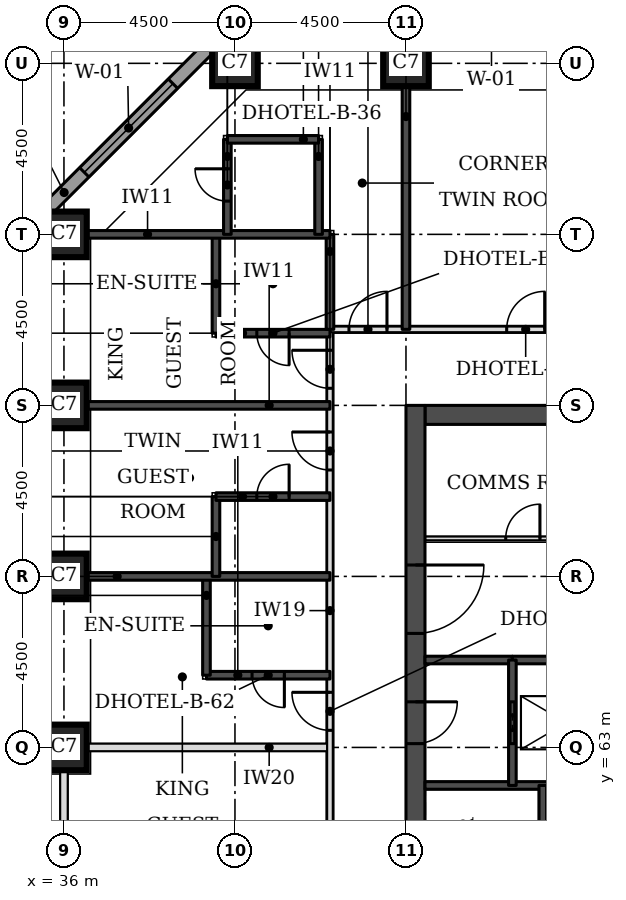
"""IFC4 building model, lengths in metres.
Left out: names, types, materials, properties, quantities, classifications, styles, units other than length and angle.
Written with IfcOpenShell. Run it as: python <this file> out.ifc"""

import sys

from ifc_helpers import new_model, si_unit, direction, frame, frame_2d, origin, origin_2d, place, context, subcontext, project, spatial, rectangle, extrude, element, fill, save


model = new_model("IFC4")
c1 = context("Model", 3, precision=1e-05, world=origin(), true_north=direction((0.0, 1.0)))
c2 = subcontext(c1, "Body", "Model", "MODEL_VIEW")
j1 = project(units=[si_unit("LENGTHUNIT", "METRE"), si_unit("PLANEANGLEUNIT", "RADIAN")], contexts=[c1])
p1 = place(None, origin())
s1 = spatial("IfcSite", under=j1, at=p1, CompositionType="ELEMENT")
p2 = place(p1, origin())
s2 = spatial("IfcBuilding", under=s1, at=p2, CompositionType="ELEMENT")
p3 = place(p2, frame((0.0, 0.0, 29.7)))
s3 = spatial("IfcBuildingStorey", under=s2, at=p3, CompositionType="ELEMENT", Elevation=29.7)
for number, where, z_axis, x_axis in (
    (1, (36.0, 63.0, 0.0), (0.0, 0.0, 1.0), (1.0, 0.0, 0.0)),
    (2, (36.0, 67.5, 0.0), (0.0, 0.0, 1.0), (1.0, 0.0, 0.0)),
    (3, (36.0, 72.0, 0.0), (0.0, 0.0, 1.0), (1.0, 0.0, 0.0)),
    (4, (36.0, 76.5, 0.0), (0.0, 0.0, 1.0), (1.0, 0.0, 0.0)),
    (5, (40.5, 81.0, 0.0), (0.0, 0.0, 1.0), (1.0, 0.0, 0.0)),
    (6, (45.0, 81.0, 0.0), (0.0, 0.0, 1.0), (1.0, 0.0, 0.0)),
):
    element("IfcColumn", number, at=place(p3, frame(where, z_axis=z_axis, x_axis=x_axis)), inside=s3, PredefinedType="COLUMN", context=c2, shape_type="SweptSolid", body=[
        extrude(rectangle(XDim=1.2, YDim=1.2, at=origin_2d()), origin(), (0.0, 0.0, 1.0), 3.3),
    ])
p4 = place(p3, frame((45.5, 71.75, 0.0), z_axis=(0.0, 0.0, 1.0), x_axis=(1.0, 0.0, 0.0)))
e7 = element("IfcWall", 7, at=p4, inside=s3, PredefinedType="SHEAR", context=c2, shape_type="SweptSolid", body=[
    extrude(rectangle(XDim=21.5, YDim=0.5, at=frame_2d((10.75, 0.0))), origin(), (0.0, 0.0, 1.0), 3.3),
])
p5 = place(p3, frame((45.25, 49.5, 0.0), z_axis=(0.0, 0.0, 1.0), x_axis=(0.0, 1.0, 0.0)))
e8 = element("IfcWall", 8, at=p5, inside=s3, PredefinedType="SHEAR", context=c2, shape_type="SweptSolid", body=[
    extrude(rectangle(XDim=22.5, YDim=0.5, at=frame_2d((11.25, 0.0))), origin(), (0.0, 0.0, 1.0), 3.3),
])
p6 = place(p5, frame((4.2, 0.0, 0.0)))
e9 = element("IfcOpeningElement", 9, at=p6, cuts=e8, PredefinedType="OPENING", context=c2, shape_type="SweptSolid", body=[
    extrude(rectangle(XDim=1.8, YDim=2.1, at=frame_2d((0.9, 1.05))), frame((0.0, 0.26, 0.0), z_axis=(0.0, -1.0, 0.0), x_axis=(1.0, 0.0, 0.0)), (0.0, 0.0, 1.0), 0.52),
])
p7 = place(p5, frame((6.9, 0.0, 0.0)))
e10 = element("IfcOpeningElement", 10, at=p7, cuts=e8, PredefinedType="OPENING", context=c2, shape_type="SweptSolid", body=[
    extrude(rectangle(XDim=1.1, YDim=2.1, at=frame_2d((0.55, 1.05))), frame((0.0, 0.26, 0.0), z_axis=(0.0, -1.0, 0.0), x_axis=(1.0, 0.0, 0.0)), (0.0, 0.0, 1.0), 0.52),
])
p8 = place(p5, frame((13.6, 0.0, 0.0)))
e11 = element("IfcOpeningElement", 11, at=p8, cuts=e8, PredefinedType="OPENING", context=c2, shape_type="SweptSolid", body=[
    extrude(rectangle(XDim=1.1, YDim=2.1, at=frame_2d((0.55, 1.05))), frame((0.0, 0.26, 0.0), z_axis=(0.0, -1.0, 0.0), x_axis=(1.0, 0.0, 0.0)), (0.0, 0.0, 1.0), 0.52),
])
p9 = place(p5, frame((16.5, 0.0, 0.0)))
e12 = element("IfcOpeningElement", 12, at=p9, cuts=e8, PredefinedType="OPENING", context=c2, shape_type="SweptSolid", body=[
    extrude(rectangle(XDim=1.8, YDim=2.1, at=frame_2d((0.9, 1.05))), frame((0.0, 0.26, 0.0), z_axis=(0.0, -1.0, 0.0), x_axis=(1.0, 0.0, 0.0)), (0.0, 0.0, 1.0), 0.52),
])
p10 = place(p3, frame((40.23, 81.826, 0.0), z_axis=(0.0, 0.0, 1.0), x_axis=(-0.707106781187, -0.707106781187, 0.0)))
e13 = element("IfcWall", 13, at=p10, inside=s3, PredefinedType="STANDARD", context=c2, shape_type="SweptSolid", body=[
    extrude(rectangle(XDim=7.151, YDim=0.35, at=frame_2d((3.576, 0.0))), origin(), (0.0, 0.0, 1.0), 3.055),
])
p11 = place(p10, frame((1.926, 0.0, 0.8)))
e14 = element("IfcOpeningElement", 14, at=p11, cuts=e13, PredefinedType="OPENING", context=c2, shape_type="SweptSolid", body=[
    extrude(rectangle(XDim=3.3, YDim=1.5, at=frame_2d((1.65, 0.75))), frame((0.0, 0.185, 0.0), z_axis=(0.0, -1.0, 0.0), x_axis=(1.0, 0.0, 0.0)), (0.0, 0.0, 1.0), 0.37),
])
p12 = place(p3, frame((36.0, 56.0, 0.0), z_axis=(0.0, 0.0, 1.0), x_axis=(0.0, 1.0, 0.0)))
e15 = element("IfcWall", 15, at=p12, inside=s3, PredefinedType="PARTITIONING", context=c2, shape_type="SweptSolid", body=[
    extrude(rectangle(XDim=6.4, YDim=0.2, at=frame_2d((3.2, 0.0))), origin(), (0.0, 0.0, 1.0), 2.33),
])
p13 = place(p3, frame((36.6, 63.0, 0.0), z_axis=(0.0, 0.0, 1.0), x_axis=(1.0, 0.0, 0.0)))
e16 = element("IfcWall", 16, at=p13, inside=s3, PredefinedType="PARTITIONING", context=c2, shape_type="SweptSolid", body=[
    extrude(rectangle(XDim=6.4, YDim=0.2, at=frame_2d((3.2, 0.0))), origin(), (0.0, 0.0, 1.0), 3.08),
])
p14 = place(p3, frame((43.0, 56.0, 0.0), z_axis=(0.0, 0.0, 1.0), x_axis=(0.0, 1.0, 0.0)))
e17 = element("IfcWall", 17, at=p14, inside=s3, PredefinedType="PARTITIONING", context=c2, shape_type="SweptSolid", body=[
    extrude(rectangle(XDim=18.0, YDim=0.15, at=frame_2d((9.0, 0.0))), origin(), (0.0, 0.0, 1.0), 3.08),
])
p15 = place(p14, frame((7.45, 0.0, 0.0)))
e18 = element("IfcOpeningElement", 18, at=p15, cuts=e17, PredefinedType="OPENING", context=c2, shape_type="SweptSolid", body=[
    extrude(rectangle(XDim=1.0, YDim=2.1, at=frame_2d((0.5, 1.05))), frame((0.0, 0.085, 0.0), z_axis=(0.0, -1.0, 0.0), x_axis=(1.0, 0.0, 0.0)), (0.0, 0.0, 1.0), 0.17),
])
p16 = place(p14, frame((14.3, 0.0, 0.0)))
e19 = element("IfcOpeningElement", 19, at=p16, cuts=e17, PredefinedType="OPENING", context=c2, shape_type="SweptSolid", body=[
    extrude(rectangle(XDim=1.0, YDim=2.1, at=frame_2d((0.5, 1.05))), frame((0.0, 0.085, 0.0), z_axis=(0.0, -1.0, 0.0), x_axis=(1.0, 0.0, 0.0)), (0.0, 0.0, 1.0), 0.17),
])
p17 = place(p14, frame((16.45, 0.0, 0.0)))
e20 = element("IfcOpeningElement", 20, at=p17, cuts=e17, PredefinedType="OPENING", context=c2, shape_type="SweptSolid", body=[
    extrude(rectangle(XDim=1.0, YDim=2.1, at=frame_2d((0.5, 1.05))), frame((0.0, 0.085, 0.0), z_axis=(0.0, -1.0, 0.0), x_axis=(1.0, 0.0, 0.0)), (0.0, 0.0, 1.0), 0.17),
])
p18 = place(p14, frame((3.05, 0.0, 0.0)))
e21 = element("IfcOpeningElement", 21, at=p18, cuts=e17, PredefinedType="OPENING", context=c2, shape_type="SweptSolid", body=[
    extrude(rectangle(XDim=0.9, YDim=2.1, at=frame_2d((0.45, 1.05))), frame((0.0, 0.085, 0.0), z_axis=(0.0, -1.0, 0.0), x_axis=(1.0, 0.0, 0.0)), (0.0, 0.0, 1.0), 0.17),
])
p19 = place(p3, frame((43.0, 74.0, 0.0), z_axis=(0.0, 0.0, 1.0), x_axis=(1.0, 0.0, 0.0)))
e22 = element("IfcWall", 22, at=p19, inside=s3, PredefinedType="PARTITIONING", context=c2, shape_type="SweptSolid", body=[
    extrude(rectangle(XDim=26.5, YDim=0.15, at=frame_2d((13.25, 0.0))), origin(), (0.0, 0.0, 1.0), 3.08),
])
p20 = place(p19, frame((4.65, 0.0, 0.0)))
e23 = element("IfcOpeningElement", 23, at=p20, cuts=e22, PredefinedType="OPENING", context=c2, shape_type="SweptSolid", body=[
    extrude(rectangle(XDim=1.0, YDim=2.1, at=frame_2d((0.5, 1.05))), frame((0.0, 0.085, 0.0), z_axis=(0.0, -1.0, 0.0), x_axis=(1.0, 0.0, 0.0)), (0.0, 0.0, 1.0), 0.17),
])
p21 = place(p19, frame((16.6, 0.0, 0.0)))
e24 = element("IfcOpeningElement", 24, at=p21, cuts=e22, PredefinedType="OPENING", context=c2, shape_type="SweptSolid", body=[
    extrude(rectangle(XDim=1.0, YDim=2.1, at=frame_2d((0.5, 1.05))), frame((0.0, 0.085, 0.0), z_axis=(0.0, -1.0, 0.0), x_axis=(1.0, 0.0, 0.0)), (0.0, 0.0, 1.0), 0.17),
])
p22 = place(p19, frame((20.7, 0.0, 0.0)))
e25 = element("IfcOpeningElement", 25, at=p22, cuts=e22, PredefinedType="OPENING", context=c2, shape_type="SweptSolid", body=[
    extrude(rectangle(XDim=1.0, YDim=2.1, at=frame_2d((0.5, 1.05))), frame((0.0, 0.085, 0.0), z_axis=(0.0, -1.0, 0.0), x_axis=(1.0, 0.0, 0.0)), (0.0, 0.0, 1.0), 0.17),
])
p23 = place(p19, frame((0.5, 0.0, 0.0)))
e26 = element("IfcOpeningElement", 26, at=p23, cuts=e22, PredefinedType="OPENING", context=c2, shape_type="SweptSolid", body=[
    extrude(rectangle(XDim=1.0, YDim=2.1, at=frame_2d((0.5, 1.05))), frame((0.0, 0.085, 0.0), z_axis=(0.0, -1.0, 0.0), x_axis=(1.0, 0.0, 0.0)), (0.0, 0.0, 1.0), 0.17),
])
p24 = place(p19, frame((25.0, 0.0, 0.0)))
e27 = element("IfcOpeningElement", 27, at=p24, cuts=e22, PredefinedType="OPENING", context=c2, shape_type="SweptSolid", body=[
    extrude(rectangle(XDim=1.0, YDim=2.1, at=frame_2d((0.5, 1.05))), frame((0.0, 0.085, 0.0), z_axis=(0.0, -1.0, 0.0), x_axis=(1.0, 0.0, 0.0)), (0.0, 0.0, 1.0), 0.17),
])
p25 = place(p3, frame((39.75, 64.9, 0.0), z_axis=(0.0, 0.0, 1.0), x_axis=(1.0, 0.0, 0.0)))
e28 = element("IfcWall", 28, at=p25, inside=s3, PredefinedType="SOLIDWALL", context=c2, shape_type="SweptSolid", body=[
    extrude(rectangle(XDim=3.25, YDim=0.2, at=frame_2d((1.625, 0.0))), origin(), (0.0, 0.0, 1.0), 3.08),
])
p26 = place(p25, frame((1.2, 0.0, 0.0)))
e29 = element("IfcOpeningElement", 29, at=p26, cuts=e28, PredefinedType="OPENING", context=c2, shape_type="SweptSolid", body=[
    extrude(rectangle(XDim=0.85, YDim=2.1, at=frame_2d((0.425, 1.05))), frame((0.0, 0.11, 0.0), z_axis=(0.0, -1.0, 0.0), x_axis=(1.0, 0.0, 0.0)), (0.0, 0.0, 1.0), 0.22),
])
p27 = place(p3, frame((39.75, 64.9, 0.0), z_axis=(0.0, 0.0, 1.0), x_axis=(0.0, 1.0, 0.0)))
e30 = element("IfcWall", 30, at=p27, inside=s3, PredefinedType="SOLIDWALL", context=c2, shape_type="SweptSolid", body=[
    extrude(rectangle(XDim=2.6, YDim=0.2, at=frame_2d((1.3, 0.0))), origin(), (0.0, 0.0, 1.0), 3.08),
])
p28 = place(p3, frame((36.6, 67.5, 0.0), z_axis=(0.0, 0.0, 1.0), x_axis=(1.0, 0.0, 0.0)))
e31 = element("IfcWall", 31, at=p28, inside=s3, PredefinedType="SOLIDWALL", context=c2, shape_type="SweptSolid", body=[
    extrude(rectangle(XDim=6.4, YDim=0.2, at=frame_2d((3.2, 0.0))), origin(), (0.0, 0.0, 1.0), 3.08),
])
p29 = place(p3, frame((40.0, 67.5, 0.0), z_axis=(0.0, 0.0, 1.0), x_axis=(0.0, 1.0, 0.0)))
e32 = element("IfcWall", 32, at=p29, inside=s3, PredefinedType="SOLIDWALL", context=c2, shape_type="SweptSolid", body=[
    extrude(rectangle(XDim=2.1, YDim=0.2, at=frame_2d((1.05, 0.0))), origin(), (0.0, 0.0, 1.0), 3.08),
])
p30 = place(p3, frame((40.0, 69.6, 0.0), z_axis=(0.0, 0.0, 1.0), x_axis=(1.0, 0.0, 0.0)))
e33 = element("IfcWall", 33, at=p30, inside=s3, PredefinedType="SOLIDWALL", context=c2, shape_type="SweptSolid", body=[
    extrude(rectangle(XDim=3.0, YDim=0.2, at=frame_2d((1.5, 0.0))), origin(), (0.0, 0.0, 1.0), 3.08),
])
p31 = place(p30, frame((1.075, 0.0, 0.0)))
e34 = element("IfcOpeningElement", 34, at=p31, cuts=e33, PredefinedType="OPENING", context=c2, shape_type="SweptSolid", body=[
    extrude(rectangle(XDim=0.85, YDim=2.1, at=frame_2d((0.425, 1.05))), frame((0.0, 0.11, 0.0), z_axis=(0.0, -1.0, 0.0), x_axis=(1.0, 0.0, 0.0)), (0.0, 0.0, 1.0), 0.22),
])
p32 = place(p3, frame((36.6, 72.0, 0.0), z_axis=(0.0, 0.0, 1.0), x_axis=(1.0, 0.0, 0.0)))
e35 = element("IfcWall", 35, at=p32, inside=s3, PredefinedType="SOLIDWALL", context=c2, shape_type="SweptSolid", body=[
    extrude(rectangle(XDim=6.4, YDim=0.2, at=frame_2d((3.2, 0.0))), origin(), (0.0, 0.0, 1.0), 3.08),
])
p33 = place(p3, frame((40.0, 73.9, 0.0), z_axis=(0.0, 0.0, 1.0), x_axis=(1.0, 0.0, 0.0)))
e36 = element("IfcWall", 36, at=p33, inside=s3, PredefinedType="SOLIDWALL", context=c2, shape_type="SweptSolid", body=[
    extrude(rectangle(XDim=3.0, YDim=0.2, at=frame_2d((1.5, 0.0))), origin(), (0.0, 0.0, 1.0), 3.08),
])
p34 = place(p33, frame((1.075, 0.0, 0.0)))
e37 = element("IfcOpeningElement", 37, at=p34, cuts=e36, PredefinedType="OPENING", context=c2, shape_type="SweptSolid", body=[
    extrude(rectangle(XDim=0.85, YDim=2.1, at=frame_2d((0.425, 1.05))), frame((0.0, 0.11, 0.0), z_axis=(0.0, -1.0, 0.0), x_axis=(1.0, 0.0, 0.0)), (0.0, 0.0, 1.0), 0.22),
])
p35 = place(p3, frame((40.0, 73.9, 0.0), z_axis=(0.0, 0.0, 1.0), x_axis=(0.0, 1.0, 0.0)))
e38 = element("IfcWall", 38, at=p35, inside=s3, PredefinedType="SOLIDWALL", context=c2, shape_type="SweptSolid", body=[
    extrude(rectangle(XDim=2.6, YDim=0.2, at=frame_2d((1.3, 0.0))), origin(), (0.0, 0.0, 1.0), 3.08),
])
p36 = place(p3, frame((43.0, 74.0, 0.0), z_axis=(0.0, 0.0, 1.0), x_axis=(0.0, 1.0, 0.0)))
e39 = element("IfcWall", 39, at=p36, inside=s3, PredefinedType="SOLIDWALL", context=c2, shape_type="SweptSolid", body=[
    extrude(rectangle(XDim=2.5, YDim=0.2, at=frame_2d((1.25, 0.0))), origin(), (0.0, 0.0, 1.0), 3.08),
])
for number, where, z_axis, x_axis in (
    (40, (45.0, 74.0, 0.0), (0.0, 0.0, 1.0), (0.0, 1.0, 0.0)),
    (41, (36.6, 76.5, 0.0), (0.0, 0.0, 1.0), (1.0, 0.0, 0.0)),
):
    element("IfcWall", number, at=place(p3, frame(where, z_axis=z_axis, x_axis=x_axis)), inside=s3, PredefinedType="SOLIDWALL", context=c2, shape_type="SweptSolid", body=[
        extrude(rectangle(XDim=6.4, YDim=0.2, at=frame_2d((3.2, 0.0))), origin(), (0.0, 0.0, 1.0), 3.08),
    ])
p37 = place(p3, frame((40.3, 76.5, 0.0), z_axis=(0.0, 0.0, 1.0), x_axis=(0.0, 1.0, 0.0)))
e42 = element("IfcWall", 42, at=p37, inside=s3, PredefinedType="SOLIDWALL", context=c2, shape_type="SweptSolid", body=[
    extrude(rectangle(XDim=2.5, YDim=0.2, at=frame_2d((1.25, 0.0))), origin(), (0.0, 0.0, 1.0), 3.08),
])
p38 = place(p37, frame((0.875, 0.0, 0.0)))
e43 = element("IfcOpeningElement", 43, at=p38, cuts=e42, PredefinedType="OPENING", context=c2, shape_type="SweptSolid", body=[
    extrude(rectangle(XDim=0.85, YDim=2.1, at=frame_2d((0.425, 1.05))), frame((0.0, 0.11, 0.0), z_axis=(0.0, -1.0, 0.0), x_axis=(1.0, 0.0, 0.0)), (0.0, 0.0, 1.0), 0.22),
])
p39 = place(p3, frame((42.7, 76.5, 0.0), z_axis=(0.0, 0.0, 1.0), x_axis=(0.0, 1.0, 0.0)))
e44 = element("IfcWall", 44, at=p39, inside=s3, PredefinedType="SOLIDWALL", context=c2, shape_type="SweptSolid", body=[
    extrude(rectangle(XDim=2.5, YDim=0.2, at=frame_2d((1.25, 0.0))), origin(), (0.0, 0.0, 1.0), 3.08),
])
p40 = place(p3, frame((40.3, 79.0, 0.0), z_axis=(0.0, 0.0, 1.0), x_axis=(1.0, 0.0, 0.0)))
e45 = element("IfcWall", 45, at=p40, inside=s3, PredefinedType="SOLIDWALL", context=c2, shape_type="SweptSolid", body=[
    extrude(rectangle(XDim=2.4, YDim=0.2, at=frame_2d((1.2, 0.0))), origin(), (0.0, 0.0, 1.0), 3.08),
])
p41 = place(p3, frame((45.5, 62.0, 0.0), z_axis=(0.0, 0.0, 1.0), x_axis=(1.0, 0.0, 0.0)))
e46 = element("IfcWall", 46, at=p41, inside=s3, PredefinedType="SOLIDWALL", context=c2, shape_type="SweptSolid", body=[
    extrude(rectangle(XDim=5.15, YDim=0.2, at=frame_2d((2.575, 0.0))), origin(), (0.0, 0.0, 1.0), 3.08),
])
p42 = place(p3, frame((45.5, 65.3, 0.0), z_axis=(0.0, 0.0, 1.0), x_axis=(1.0, 0.0, 0.0)))
e47 = element("IfcWall", 47, at=p42, inside=s3, PredefinedType="SOLIDWALL", context=c2, shape_type="SweptSolid", body=[
    extrude(rectangle(XDim=2.3, YDim=0.2, at=frame_2d((1.15, 0.0))), origin(), (0.0, 0.0, 1.0), 3.08),
])
p43 = place(p3, frame((47.8, 65.3, 0.0), z_axis=(0.0, 0.0, 1.0), x_axis=(1.0, 0.0, 0.0)))
e48 = element("IfcWall", 48, at=p43, inside=s3, PredefinedType="SOLIDWALL", context=c2, shape_type="SweptSolid", body=[
    extrude(rectangle(XDim=16.9, YDim=0.2, at=frame_2d((8.45, 0.0))), origin(), (0.0, 0.0, 1.0), 3.08),
])
p44 = place(p3, frame((45.5, 68.5, 0.0), z_axis=(0.0, 0.0, 1.0), x_axis=(1.0, 0.0, 0.0)))
e49 = element("IfcWall", 49, at=p44, inside=s3, PredefinedType="PARTITIONING", context=c2, shape_type="SweptSolid", body=[
    extrude(rectangle(XDim=5.15, YDim=0.1, at=frame_2d((2.575, 0.0))), origin(), (0.0, 0.0, 1.0), 3.08),
])
p45 = place(p44, frame((2.125, 0.0, 0.0)))
e50 = element("IfcOpeningElement", 50, at=p45, cuts=e49, PredefinedType="OPENING", context=c2, shape_type="SweptSolid", body=[
    extrude(rectangle(XDim=0.9, YDim=2.1, at=frame_2d((0.45, 1.05))), frame((0.0, 0.06, 0.0), z_axis=(0.0, -1.0, 0.0), x_axis=(1.0, 0.0, 0.0)), (0.0, 0.0, 1.0), 0.12),
])
p46 = place(p3, frame((47.8, 62.0, 0.0), z_axis=(0.0, 0.0, 1.0), x_axis=(0.0, 1.0, 0.0)))
e51 = element("IfcWall", 51, at=p46, inside=s3, PredefinedType="SOLIDWALL", context=c2, shape_type="SweptSolid", body=[
    extrude(rectangle(XDim=3.3, YDim=0.2, at=frame_2d((1.65, 0.0))), origin(), (0.0, 0.0, 1.0), 3.08),
])
p47 = place(p46, frame((1.1, 0.0, 0.0)))
e52 = element("IfcOpeningElement", 52, at=p47, cuts=e51, PredefinedType="OPENING", context=c2, shape_type="SweptSolid", body=[
    extrude(rectangle(XDim=1.1, YDim=2.1, at=frame_2d((0.55, 1.05))), frame((0.0, 0.11, 0.0), z_axis=(0.0, -1.0, 0.0), x_axis=(1.0, 0.0, 0.0)), (0.0, 0.0, 1.0), 0.22),
])
p48 = place(p3, frame((48.6, 56.2, 0.0), z_axis=(0.0, 0.0, 1.0), x_axis=(0.0, 1.0, 0.0)))
e53 = element("IfcWall", 53, at=p48, inside=s3, PredefinedType="SOLIDWALL", context=c2, shape_type="SweptSolid", body=[
    extrude(rectangle(XDim=5.8, YDim=0.2, at=frame_2d((2.9, 0.0))), origin(), (0.0, 0.0, 1.0), 3.08),
])
p49 = place(p11, origin())
e54 = element("IfcWindow", 54, at=p49, inside=s3, PartitioningType="SINGLE_PANEL", PredefinedType="WINDOW", context=c2, shape_type="SweptSolid", body=[
    extrude(rectangle(XDim=3.3, YDim=1.5, at=frame_2d((1.65, 0.75))), frame((0.0, 0.085, 0.0), z_axis=(0.0, -1.0, 0.0), x_axis=(1.0, 0.0, 0.0)), (0.0, 0.0, 1.0), 0.06),
])
fill(e14, e54)
p50 = place(p15, origin())
e55 = element("IfcDoor", 55, at=p50, inside=s3, OperationType="SINGLE_SWING_RIGHT", PredefinedType="DOOR", context=c2, shape_type="SweptSolid", body=[
    extrude(rectangle(XDim=1.0, YDim=2.1, at=frame_2d((0.5, 1.05))), frame((0.0, 0.025, 0.0), z_axis=(0.0, -1.0, 0.0), x_axis=(1.0, 0.0, 0.0)), (0.0, 0.0, 1.0), 0.05),
])
fill(e18, e55)
p51 = place(p26, frame((0.85, 0.0, 0.0), z_axis=(0.0, 0.0, 1.0), x_axis=(-1.0, 0.0, 0.0)))
e56 = element("IfcDoor", 56, at=p51, inside=s3, OperationType="SINGLE_SWING_LEFT", PredefinedType="DOOR", context=c2, shape_type="SweptSolid", body=[
    extrude(rectangle(XDim=0.85, YDim=2.1, at=frame_2d((0.425, 1.05))), frame((0.0, 0.025, 0.0), z_axis=(0.0, -1.0, 0.0), x_axis=(1.0, 0.0, 0.0)), (0.0, 0.0, 1.0), 0.05),
])
fill(e29, e56)
p52 = place(p16, origin())
e57 = element("IfcDoor", 57, at=p52, inside=s3, OperationType="SINGLE_SWING_RIGHT", PredefinedType="DOOR", context=c2, shape_type="SweptSolid", body=[
    extrude(rectangle(XDim=1.0, YDim=2.1, at=frame_2d((0.5, 1.05))), frame((0.0, 0.025, 0.0), z_axis=(0.0, -1.0, 0.0), x_axis=(1.0, 0.0, 0.0)), (0.0, 0.0, 1.0), 0.05),
])
fill(e19, e57)
p53 = place(p31, origin())
e58 = element("IfcDoor", 58, at=p53, inside=s3, OperationType="SINGLE_SWING_RIGHT", PredefinedType="DOOR", context=c2, shape_type="SweptSolid", body=[
    extrude(rectangle(XDim=0.85, YDim=2.1, at=frame_2d((0.425, 1.05))), frame((0.0, 0.025, 0.0), z_axis=(0.0, -1.0, 0.0), x_axis=(1.0, 0.0, 0.0)), (0.0, 0.0, 1.0), 0.05),
])
fill(e34, e58)
p54 = place(p17, origin())
e59 = element("IfcDoor", 59, at=p54, inside=s3, OperationType="SINGLE_SWING_RIGHT", PredefinedType="DOOR", context=c2, shape_type="SweptSolid", body=[
    extrude(rectangle(XDim=1.0, YDim=2.1, at=frame_2d((0.5, 1.05))), frame((0.0, 0.025, 0.0), z_axis=(0.0, -1.0, 0.0), x_axis=(1.0, 0.0, 0.0)), (0.0, 0.0, 1.0), 0.05),
])
fill(e20, e59)
p55 = place(p34, frame((0.85, 0.0, 0.0), z_axis=(0.0, 0.0, 1.0), x_axis=(-1.0, 0.0, 0.0)))
e60 = element("IfcDoor", 60, at=p55, inside=s3, OperationType="SINGLE_SWING_LEFT", PredefinedType="DOOR", context=c2, shape_type="SweptSolid", body=[
    extrude(rectangle(XDim=0.85, YDim=2.1, at=frame_2d((0.425, 1.05))), frame((0.0, 0.025, 0.0), z_axis=(0.0, -1.0, 0.0), x_axis=(1.0, 0.0, 0.0)), (0.0, 0.0, 1.0), 0.05),
])
fill(e37, e60)
p56 = place(p20, origin())
e61 = element("IfcDoor", 61, at=p56, inside=s3, OperationType="SINGLE_SWING_RIGHT", PredefinedType="DOOR", context=c2, shape_type="SweptSolid", body=[
    extrude(rectangle(XDim=1.0, YDim=2.1, at=frame_2d((0.5, 1.05))), frame((0.0, 0.025, 0.0), z_axis=(0.0, -1.0, 0.0), x_axis=(1.0, 0.0, 0.0)), (0.0, 0.0, 1.0), 0.05),
])
fill(e23, e61)
p57 = place(p23, origin())
e62 = element("IfcDoor", 62, at=p57, inside=s3, OperationType="SINGLE_SWING_RIGHT", PredefinedType="DOOR", context=c2, shape_type="SweptSolid", body=[
    extrude(rectangle(XDim=1.0, YDim=2.1, at=frame_2d((0.5, 1.05))), frame((0.0, 0.025, 0.0), z_axis=(0.0, -1.0, 0.0), x_axis=(1.0, 0.0, 0.0)), (0.0, 0.0, 1.0), 0.05),
])
fill(e26, e62)
p58 = place(p38, origin())
e63 = element("IfcDoor", 63, at=p58, inside=s3, OperationType="SINGLE_SWING_RIGHT", PredefinedType="DOOR", context=c2, shape_type="SweptSolid", body=[
    extrude(rectangle(XDim=0.85, YDim=2.1, at=frame_2d((0.425, 1.05))), frame((0.0, 0.025, 0.0), z_axis=(0.0, -1.0, 0.0), x_axis=(1.0, 0.0, 0.0)), (0.0, 0.0, 1.0), 0.05),
])
fill(e43, e63)
p59 = place(p47, origin())
e64 = element("IfcDoor", 64, at=p59, inside=s3, OperationType="DOUBLE_DOOR_SLIDING", PredefinedType="DOOR", context=c2, shape_type="SweptSolid", body=[
    extrude(rectangle(XDim=1.1, YDim=2.1, at=frame_2d((0.55, 1.05))), frame((0.0, 0.025, 0.0), z_axis=(0.0, -1.0, 0.0), x_axis=(1.0, 0.0, 0.0)), (0.0, 0.0, 1.0), 0.05),
])
fill(e52, e64)
p60 = place(p8, frame((1.1, 0.0, 0.0), z_axis=(0.0, 0.0, 1.0), x_axis=(-1.0, 0.0, 0.0)))
e65 = element("IfcDoor", 65, at=p60, inside=s3, OperationType="SINGLE_SWING_LEFT", PredefinedType="DOOR", context=c2, shape_type="SweptSolid", body=[
    extrude(rectangle(XDim=1.1, YDim=2.1, at=frame_2d((0.55, 1.05))), frame((0.0, 0.025, 0.0), z_axis=(0.0, -1.0, 0.0), x_axis=(1.0, 0.0, 0.0)), (0.0, 0.0, 1.0), 0.05),
])
fill(e11, e65)
p61 = place(p9, frame((1.8, 0.0, 0.0), z_axis=(0.0, 0.0, 1.0), x_axis=(-1.0, 0.0, 0.0)))
e66 = element("IfcDoor", 66, at=p61, inside=s3, OperationType="SINGLE_SWING_LEFT", PredefinedType="DOOR", context=c2, shape_type="SweptSolid", body=[
    extrude(rectangle(XDim=1.8, YDim=2.1, at=frame_2d((0.9, 1.05))), frame((0.0, 0.025, 0.0), z_axis=(0.0, -1.0, 0.0), x_axis=(1.0, 0.0, 0.0)), (0.0, 0.0, 1.0), 0.05),
])
fill(e12, e66)
p62 = place(p45, origin())
e67 = element("IfcDoor", 67, at=p62, inside=s3, OperationType="SINGLE_SWING_RIGHT", PredefinedType="DOOR", context=c2, shape_type="SweptSolid", body=[
    extrude(rectangle(XDim=0.9, YDim=2.1, at=frame_2d((0.45, 1.05))), frame((0.0, 0.025, 0.0), z_axis=(0.0, -1.0, 0.0), x_axis=(1.0, 0.0, 0.0)), (0.0, 0.0, 1.0), 0.05),
])
fill(e50, e67)
save(model, sys.argv[1])
